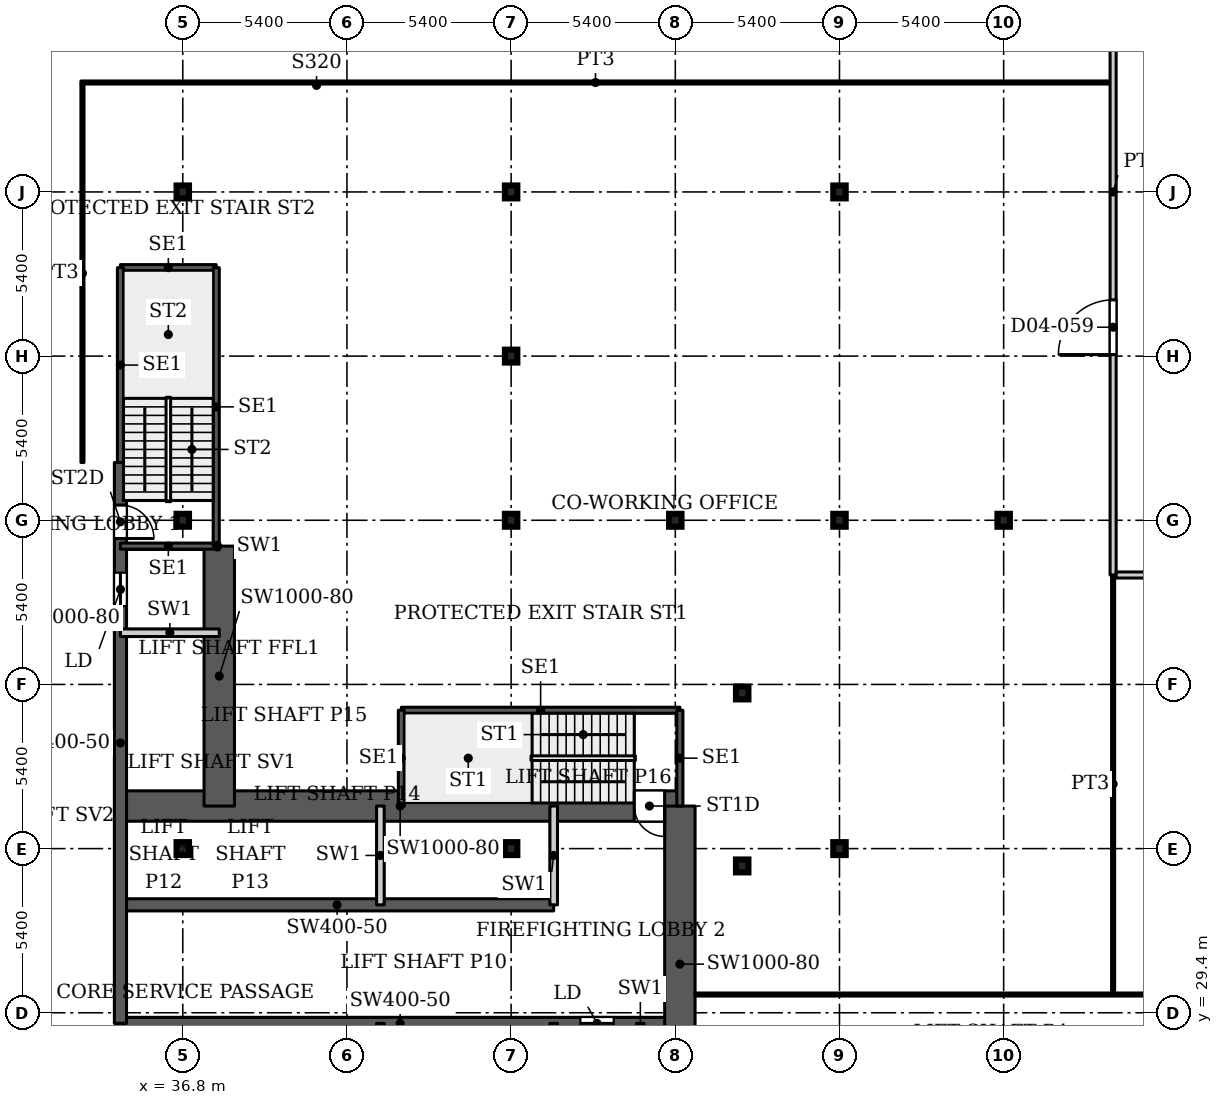
"""IFC4 building model, lengths in metres.
Left out: names, types, materials, properties, quantities, classifications, styles, units other than length and angle.
Written with IfcOpenShell. Run it as: python <this file> out.ifc"""

import sys

from ifc_helpers import new_model, si_unit, direction, frame, frame_2d, origin, origin_2d, place, context, subcontext, project, spatial, rectangle, i_section, extrude, source, transform, mapped, element, fill, save


model = new_model("IFC4")
c1 = context("Model", 3, precision=1e-05, world=origin(), true_north=direction((0.0, 1.0)))
c2 = subcontext(c1, "Body", "Model", "MODEL_VIEW")
j1 = project(units=[si_unit("LENGTHUNIT", "METRE"), si_unit("PLANEANGLEUNIT", "RADIAN")], contexts=[c1])
p1 = place(None, origin())
s1 = spatial("IfcSite", under=j1, at=p1, CompositionType="ELEMENT")
p2 = place(p1, origin())
s2 = spatial("IfcBuilding", under=s1, at=p2, CompositionType="ELEMENT")
p3 = place(p2, frame((0.0, 0.0, 21.5)))
s3 = spatial("IfcBuildingStorey", under=s2, at=p3, CompositionType="ELEMENT", Elevation=21.5)
for number, where, z_axis, x_axis in (
    (1, (36.8, 34.8, 0.0), (0.0, 0.0, 1.0), (1.0, 0.0, 0.0)),
    (2, (47.6, 34.8, 0.0), (0.0, 0.0, 1.0), (1.0, 0.0, 0.0)),
    (3, (58.4, 34.8, 0.0), (0.0, 0.0, 1.0), (1.0, 0.0, 0.0)),
    (4, (36.8, 45.6, 0.0), (0.0, 0.0, 1.0), (1.0, 0.0, 0.0)),
    (5, (47.6, 45.6, 0.0), (0.0, 0.0, 1.0), (1.0, 0.0, 0.0)),
    (6, (58.4, 45.6, 0.0), (0.0, 0.0, 1.0), (1.0, 0.0, 0.0)),
    (7, (36.8, 56.4, 0.0), (0.0, 0.0, 1.0), (1.0, 0.0, 0.0)),
    (8, (47.6, 56.4, 0.0), (0.0, 0.0, 1.0), (1.0, 0.0, 0.0)),
    (9, (58.4, 56.4, 0.0), (0.0, 0.0, 1.0), (1.0, 0.0, 0.0)),
    (10, (53.0, 45.6, 0.0), (0.0, 0.0, 1.0), (1.0, 0.0, 0.0)),
    (11, (63.8, 45.6, 0.0), (0.0, 0.0, 1.0), (1.0, 0.0, 0.0)),
    (12, (47.6, 51.0, 0.0), (0.0, 0.0, 1.0), (1.0, 0.0, 0.0)),
    (13, (55.2, 34.23, 0.0), (0.0, 0.0, 1.0), (1.0, 0.0, 0.0)),
    (14, (55.2, 39.92, 0.0), (0.0, 0.0, 1.0), (1.0, 0.0, 0.0)),
):
    element("IfcColumn", number, at=place(p3, frame(where, z_axis=z_axis, x_axis=x_axis)), inside=s3, PredefinedType="COLUMN", context=c2, shape_type="SweptSolid", body=[
        extrude(i_section(OverallWidth=0.409, OverallDepth=0.425, WebThickness=0.033, FlangeThickness=0.052, FilletRadius=0.013, at=origin_2d()), origin(), (0.0, 0.0, 1.0), 4.5),
    ])
p4 = place(p3, frame((34.75, 29.05, 0.0), z_axis=(0.0, 0.0, 1.0), x_axis=(1.0, 0.0, 0.0)))
e15 = element("IfcWall", 15, at=p4, inside=s3, PredefinedType="SHEAR", context=c2, shape_type="SweptSolid", body=[
    extrude(rectangle(XDim=18.4, YDim=0.4, at=frame_2d((9.2, 0.0))), origin(), (0.0, 0.0, 1.0), 4.5),
])
p5 = place(p4, frame((15.125, 0.0, 0.0)))
e16 = element("IfcOpeningElement", 16, at=p5, cuts=e15, PredefinedType="OPENING", context=c2, shape_type="SweptSolid", body=[
    extrude(rectangle(XDim=1.1, YDim=2.2, at=frame_2d((0.55, 1.1))), frame((0.0, 0.21, 0.0), z_axis=(0.0, -1.0, 0.0), x_axis=(1.0, 0.0, 0.0)), (0.0, 0.0, 1.0), 0.42),
])
p6 = place(p3, frame((34.75, 32.95, 0.0), z_axis=(0.0, 0.0, 1.0), x_axis=(1.0, 0.0, 0.0)))
e17 = element("IfcWall", 17, at=p6, inside=s3, PredefinedType="SHEAR", context=c2, shape_type="SweptSolid", body=[
    extrude(rectangle(XDim=14.25, YDim=0.4, at=frame_2d((7.125, 0.0))), origin(), (0.0, 0.0, 1.0), 4.5),
])
p7 = place(p3, frame((34.75, 36.2, 0.0), z_axis=(0.0, 0.0, 1.0), x_axis=(1.0, 0.0, 0.0)))
e18 = element("IfcWall", 18, at=p7, inside=s3, PredefinedType="SHEAR", context=c2, shape_type="SweptSolid", body=[
    extrude(rectangle(XDim=18.4, YDim=1.0, at=frame_2d((9.2, 0.0))), origin(), (0.0, 0.0, 1.0), 4.5),
])
p8 = place(p7, frame((16.9, 0.0, 0.0)))
e19 = element("IfcOpeningElement", 19, at=p8, cuts=e18, PredefinedType="OPENING", context=c2, shape_type="SweptSolid", body=[
    extrude(rectangle(XDim=1.0, YDim=2.2, at=frame_2d((0.5, 1.1))), frame((0.0, 0.51, 0.0), z_axis=(0.0, -1.0, 0.0), x_axis=(1.0, 0.0, 0.0)), (0.0, 0.0, 1.0), 1.02),
])
p9 = place(p3, frame((34.75, 29.05, 0.0), z_axis=(0.0, 0.0, 1.0), x_axis=(0.0, 1.0, 0.0)))
e20 = element("IfcWall", 20, at=p9, inside=s3, PredefinedType="SHEAR", context=c2, shape_type="SweptSolid", body=[
    extrude(rectangle(XDim=18.45, YDim=0.4, at=frame_2d((9.225, 0.0))), origin(), (0.0, 0.0, 1.0), 4.5),
])
p10 = place(p9, frame((13.725, 0.0, 0.0)))
e21 = element("IfcOpeningElement", 21, at=p10, cuts=e20, PredefinedType="OPENING", context=c2, shape_type="SweptSolid", body=[
    extrude(rectangle(XDim=1.1, YDim=2.2, at=frame_2d((0.55, 1.1))), frame((0.0, 0.21, 0.0), z_axis=(0.0, -1.0, 0.0), x_axis=(1.0, 0.0, 0.0)), (0.0, 0.0, 1.0), 0.42),
])
p11 = place(p9, frame((15.95, 0.0, 0.0)))
e22 = element("IfcOpeningElement", 22, at=p11, cuts=e20, PredefinedType="OPENING", context=c2, shape_type="SweptSolid", body=[
    extrude(rectangle(XDim=1.1, YDim=2.2, at=frame_2d((0.55, 1.1))), frame((0.0, 0.21, 0.0), z_axis=(0.0, -1.0, 0.0), x_axis=(1.0, 0.0, 0.0)), (0.0, 0.0, 1.0), 0.42),
])
p12 = place(p3, frame((38.0, 36.2, 0.0), z_axis=(0.0, 0.0, 1.0), x_axis=(0.0, 1.0, 0.0)))
e23 = element("IfcWall", 23, at=p12, inside=s3, PredefinedType="SHEAR", context=c2, shape_type="SweptSolid", body=[
    extrude(rectangle(XDim=8.55, YDim=1.0, at=frame_2d((4.275, 0.0))), origin(), (0.0, 0.0, 1.0), 4.5),
])
p13 = place(p3, frame((53.15, 25.8, 0.0), z_axis=(0.0, 0.0, 1.0), x_axis=(0.0, 1.0, 0.0)))
e24 = element("IfcWall", 24, at=p13, inside=s3, PredefinedType="SHEAR", context=c2, shape_type="SweptSolid", body=[
    extrude(rectangle(XDim=10.4, YDim=1.0, at=frame_2d((5.2, 0.0))), origin(), (0.0, 0.0, 1.0), 4.5),
])
p14 = place(p3, frame((43.99, 39.35, 0.0), z_axis=(0.0, 0.0, 1.0), x_axis=(1.0, 0.0, 0.0)))
e25 = element("IfcWall", 25, at=p14, inside=s3, PredefinedType="SHEAR", context=c2, shape_type="SweptSolid", body=[
    extrude(rectangle(XDim=9.16, YDim=0.2, at=frame_2d((4.58, 0.0))), origin(), (0.0, 0.0, 1.0), 4.5),
])
for number, where, z_axis, x_axis in (
    (26, (43.99, 36.2, 0.0), (0.0, 0.0, 1.0), (0.0, 1.0, 0.0)),
    (27, (53.15, 36.2, 0.0), (0.0, 0.0, 1.0), (0.0, 1.0, 0.0)),
):
    element("IfcWall", number, at=place(p3, frame(where, z_axis=z_axis, x_axis=x_axis)), inside=s3, PredefinedType="SHEAR", context=c2, shape_type="SweptSolid", body=[
        extrude(rectangle(XDim=3.15, YDim=0.2, at=frame_2d((1.575, 0.0))), origin(), (0.0, 0.0, 1.0), 4.5),
    ])
for number, where, z_axis, x_axis in (
    (28, (34.75, 44.75, 0.0), (0.0, 0.0, 1.0), (1.0, 0.0, 0.0)),
    (29, (34.75, 53.91, 0.0), (0.0, 0.0, 1.0), (1.0, 0.0, 0.0)),
):
    element("IfcWall", number, at=place(p3, frame(where, z_axis=z_axis, x_axis=x_axis)), inside=s3, PredefinedType="SHEAR", context=c2, shape_type="SweptSolid", body=[
        extrude(rectangle(XDim=3.15, YDim=0.2, at=frame_2d((1.575, 0.0))), origin(), (0.0, 0.0, 1.0), 4.5),
    ])
p15 = place(p3, frame((34.75, 47.5, 0.0), z_axis=(0.0, 0.0, 1.0), x_axis=(0.0, 1.0, 0.0)))
e30 = element("IfcWall", 30, at=p15, inside=s3, PredefinedType="SHEAR", context=c2, shape_type="SweptSolid", body=[
    extrude(rectangle(XDim=6.41, YDim=0.2, at=frame_2d((3.205, 0.0))), origin(), (0.0, 0.0, 1.0), 4.5),
])
p16 = place(p3, frame((37.9, 44.75, 0.0), z_axis=(0.0, 0.0, 1.0), x_axis=(0.0, 1.0, 0.0)))
e31 = element("IfcWall", 31, at=p16, inside=s3, PredefinedType="SHEAR", context=c2, shape_type="SweptSolid", body=[
    extrude(rectangle(XDim=9.16, YDim=0.2, at=frame_2d((4.58, 0.0))), origin(), (0.0, 0.0, 1.0), 4.5),
])
for number, where, z_axis, x_axis in (
    (32, (34.75, 25.8, 0.0), (0.0, 0.0, 1.0), (0.0, 1.0, 0.0)),
    (33, (43.3, 25.8, 0.0), (0.0, 0.0, 1.0), (0.0, 1.0, 0.0)),
    (34, (43.3, 32.95, 0.0), (0.0, 0.0, 1.0), (0.0, 1.0, 0.0)),
    (35, (49.0, 25.8, 0.0), (0.0, 0.0, 1.0), (0.0, 1.0, 0.0)),
    (36, (49.0, 32.95, 0.0), (0.0, 0.0, 1.0), (0.0, 1.0, 0.0)),
    (37, (51.85, 25.8, 0.0), (0.0, 0.0, 1.0), (0.0, 1.0, 0.0)),
    (38, (34.75, 41.9, 0.0), (0.0, 0.0, 1.0), (1.0, 0.0, 0.0)),
):
    element("IfcWall", number, at=place(p3, frame(where, z_axis=z_axis, x_axis=x_axis)), inside=s3, PredefinedType="PARTITIONING", context=c2, shape_type="SweptSolid", body=[
        extrude(rectangle(XDim=3.25, YDim=0.25, at=frame_2d((1.625, 0.0))), origin(), (0.0, 0.0, 1.0), 4.5),
    ])
p17 = place(p3, frame((37.9, 44.75, 0.0), z_axis=(0.0, 0.0, 1.0), x_axis=(1.0, 0.0, 0.0)))
e39 = element("IfcWall", 39, at=p17, inside=s3, PredefinedType="PARTITIONING", context=c2, shape_type="SweptSolid", body=[
    extrude(rectangle(XDim=0.1, YDim=0.25, at=frame_2d((0.05, 0.0))), origin(), (0.0, 0.0, 1.0), 4.5),
])
p18 = place(p3, frame((33.45, 60.0, 0.0), z_axis=(0.0, 0.0, 1.0), x_axis=(1.0, 0.0, 0.0)))
e40 = element("IfcWall", 40, at=p18, inside=s3, PredefinedType="PARTITIONING", context=c2, shape_type="SweptSolid", body=[
    extrude(rectangle(XDim=33.85, YDim=0.1, at=frame_2d((16.925, 0.0))), origin(), (0.0, 0.0, 1.0), 4.18),
])
p19 = place(p3, frame((33.5, 47.5, 0.0), z_axis=(0.0, 0.0, 1.0), x_axis=(0.0, 1.0, 0.0)))
e41 = element("IfcWall", 41, at=p19, inside=s3, PredefinedType="PARTITIONING", context=c2, shape_type="SweptSolid", body=[
    extrude(rectangle(XDim=12.45, YDim=0.1, at=frame_2d((6.225, 0.0))), origin(), (0.0, 0.0, 1.0), 4.18),
])
p20 = place(p3, frame((53.649, 30.0, 0.0), z_axis=(0.0, 0.0, 1.0), x_axis=(1.0, 0.0, 0.0)))
e42 = element("IfcWall", 42, at=p20, inside=s3, PredefinedType="PARTITIONING", context=c2, shape_type="SweptSolid", body=[
    extrude(rectangle(XDim=38.301, YDim=0.1, at=frame_2d((19.15, 0.0))), origin(), (0.0, 0.0, 1.0), 4.18),
])
p21 = place(p3, frame((67.4, 30.05, 0.0), z_axis=(0.0, 0.0, 1.0), x_axis=(0.0, 1.0, 0.0)))
e43 = element("IfcWall", 43, at=p21, inside=s3, PredefinedType="PARTITIONING", context=c2, shape_type="SweptSolid", body=[
    extrude(rectangle(XDim=13.75, YDim=0.1, at=frame_2d((6.875, 0.0))), origin(), (0.0, 0.0, 1.0), 4.18),
])
p22 = place(p3, frame((67.4, 43.8, 0.0), z_axis=(0.0, 0.0, 1.0), x_axis=(0.0, 1.0, 0.0)))
e44 = element("IfcWall", 44, at=p22, inside=s3, PredefinedType="PARTITIONING", context=c2, shape_type="SweptSolid", body=[
    extrude(rectangle(XDim=25.2, YDim=0.2, at=frame_2d((12.6, 0.0))), origin(), (0.0, 0.0, 1.0), 4.18),
])
p23 = place(p22, frame((7.25, 0.0, 0.0)))
e45 = element("IfcOpeningElement", 45, at=p23, cuts=e44, PredefinedType="OPENING", context=c2, shape_type="SweptSolid", body=[
    extrude(rectangle(XDim=1.8, YDim=2.1, at=frame_2d((0.9, 1.05))), frame((0.0, 0.11, 0.0), z_axis=(0.0, -1.0, 0.0), x_axis=(1.0, 0.0, 0.0)), (0.0, 0.0, 1.0), 0.22),
])
p24 = place(p22, frame((19.75, 0.0, 0.0)))
e46 = element("IfcOpeningElement", 46, at=p24, cuts=e44, PredefinedType="OPENING", context=c2, shape_type="SweptSolid", body=[
    extrude(rectangle(XDim=1.8, YDim=2.1, at=frame_2d((0.9, 1.05))), frame((0.0, 0.11, 0.0), z_axis=(0.0, -1.0, 0.0), x_axis=(1.0, 0.0, 0.0)), (0.0, 0.0, 1.0), 0.22),
])
p25 = place(p3, frame((67.5, 43.8, 0.0), z_axis=(0.0, 0.0, 1.0), x_axis=(1.0, 0.0, 0.0)))
e47 = element("IfcWall", 47, at=p25, inside=s3, PredefinedType="PARTITIONING", context=c2, shape_type="SweptSolid", body=[
    extrude(rectangle(XDim=24.4, YDim=0.2, at=frame_2d((12.2, 0.0))), origin(), (0.0, 0.0, 1.0), 4.18),
])
p26 = place(p25, frame((11.3, 0.0, 0.0)))
e48 = element("IfcOpeningElement", 48, at=p26, cuts=e47, PredefinedType="OPENING", context=c2, shape_type="SweptSolid", body=[
    extrude(rectangle(XDim=1.8, YDim=2.1, at=frame_2d((0.9, 1.05))), frame((0.0, 0.11, 0.0), z_axis=(0.0, -1.0, 0.0), x_axis=(1.0, 0.0, 0.0)), (0.0, 0.0, 1.0), 0.22),
])
m1 = source(origin(), c2, "Body", "SweptSolid", [
    extrude(rectangle(XDim=1.1, YDim=2.2, at=frame_2d((0.55, 1.1))), frame((0.0, 0.025, 0.0), z_axis=(0.0, -1.0, 0.0), x_axis=(1.0, 0.0, 0.0)), (0.0, 0.0, 1.0), 0.05),
])
p27 = place(p10, origin())
e49 = element("IfcDoor", 49, at=p27, inside=s3, OperationType="SLIDING_TO_LEFT", PredefinedType="DOOR", context=c2, shape_type="MappedRepresentation", body=[
    mapped(m1, transform((0.0, 0.0, 0.0), x_axis=(1.0, 0.0, 0.0), y_axis=(0.0, 1.0, 0.0), z_axis=(0.0, 0.0, 1.0), scale=1.0)),
])
fill(e21, e49)
p28 = place(p5, origin())
e50 = element("IfcDoor", 50, at=p28, inside=s3, OperationType="SLIDING_TO_LEFT", PredefinedType="DOOR", context=c2, shape_type="MappedRepresentation", body=[
    mapped(m1, transform((0.0, 0.0, 0.0), x_axis=(1.0, 0.0, 0.0), y_axis=(0.0, 1.0, 0.0), z_axis=(0.0, 0.0, 1.0), scale=1.0)),
])
fill(e16, e50)
m2 = source(origin(), c2, "Body", "SweptSolid", [
    extrude(rectangle(XDim=1.0, YDim=2.2, at=frame_2d((0.5, 1.1))), frame((0.0, 0.025, 0.0), z_axis=(0.0, -1.0, 0.0), x_axis=(1.0, 0.0, 0.0)), (0.0, 0.0, 1.0), 0.05),
])
p29 = place(p8, origin())
e51 = element("IfcDoor", 51, at=p29, inside=s3, OperationType="SINGLE_SWING_RIGHT", PredefinedType="DOOR", context=c2, shape_type="MappedRepresentation", body=[
    mapped(m2, transform((0.0, 0.0, 0.0), x_axis=(1.0, 0.0, 0.0), y_axis=(0.0, 1.0, 0.0), z_axis=(0.0, 0.0, 1.0), scale=1.0)),
])
fill(e19, e51)
m3 = source(origin(), c2, "Body", "SweptSolid", [
    extrude(rectangle(XDim=1.1, YDim=2.2, at=frame_2d((0.55, 1.1))), frame((0.0, 0.025, 0.0), z_axis=(0.0, -1.0, 0.0), x_axis=(1.0, 0.0, 0.0)), (0.0, 0.0, 1.0), 0.05),
])
p30 = place(p11, origin())
e52 = element("IfcDoor", 52, at=p30, inside=s3, OperationType="SINGLE_SWING_RIGHT", PredefinedType="DOOR", context=c2, shape_type="MappedRepresentation", body=[
    mapped(m3, transform((0.0, 0.0, 0.0), x_axis=(1.0, 0.0, 0.0), y_axis=(0.0, 1.0, 0.0), z_axis=(0.0, 0.0, 1.0), scale=1.0)),
])
fill(e22, e52)
m4 = source(origin(), c2, "Body", "SweptSolid", [
    extrude(rectangle(XDim=1.8, YDim=2.1, at=frame_2d((0.9, 1.05))), frame((0.0, 0.025, 0.0), z_axis=(0.0, -1.0, 0.0), x_axis=(1.0, 0.0, 0.0)), (0.0, 0.0, 1.0), 0.05),
])
p31 = place(p23, origin())
e53 = element("IfcDoor", 53, at=p31, inside=s3, OperationType="DOUBLE_DOOR_SINGLE_SWING", PredefinedType="DOOR", context=c2, shape_type="MappedRepresentation", body=[
    mapped(m4, transform((0.0, 0.0, 0.0), x_axis=(1.0, 0.0, 0.0), y_axis=(0.0, 1.0, 0.0), z_axis=(0.0, 0.0, 1.0), scale=1.0)),
])
fill(e45, e53)
save(model, sys.argv[1])
